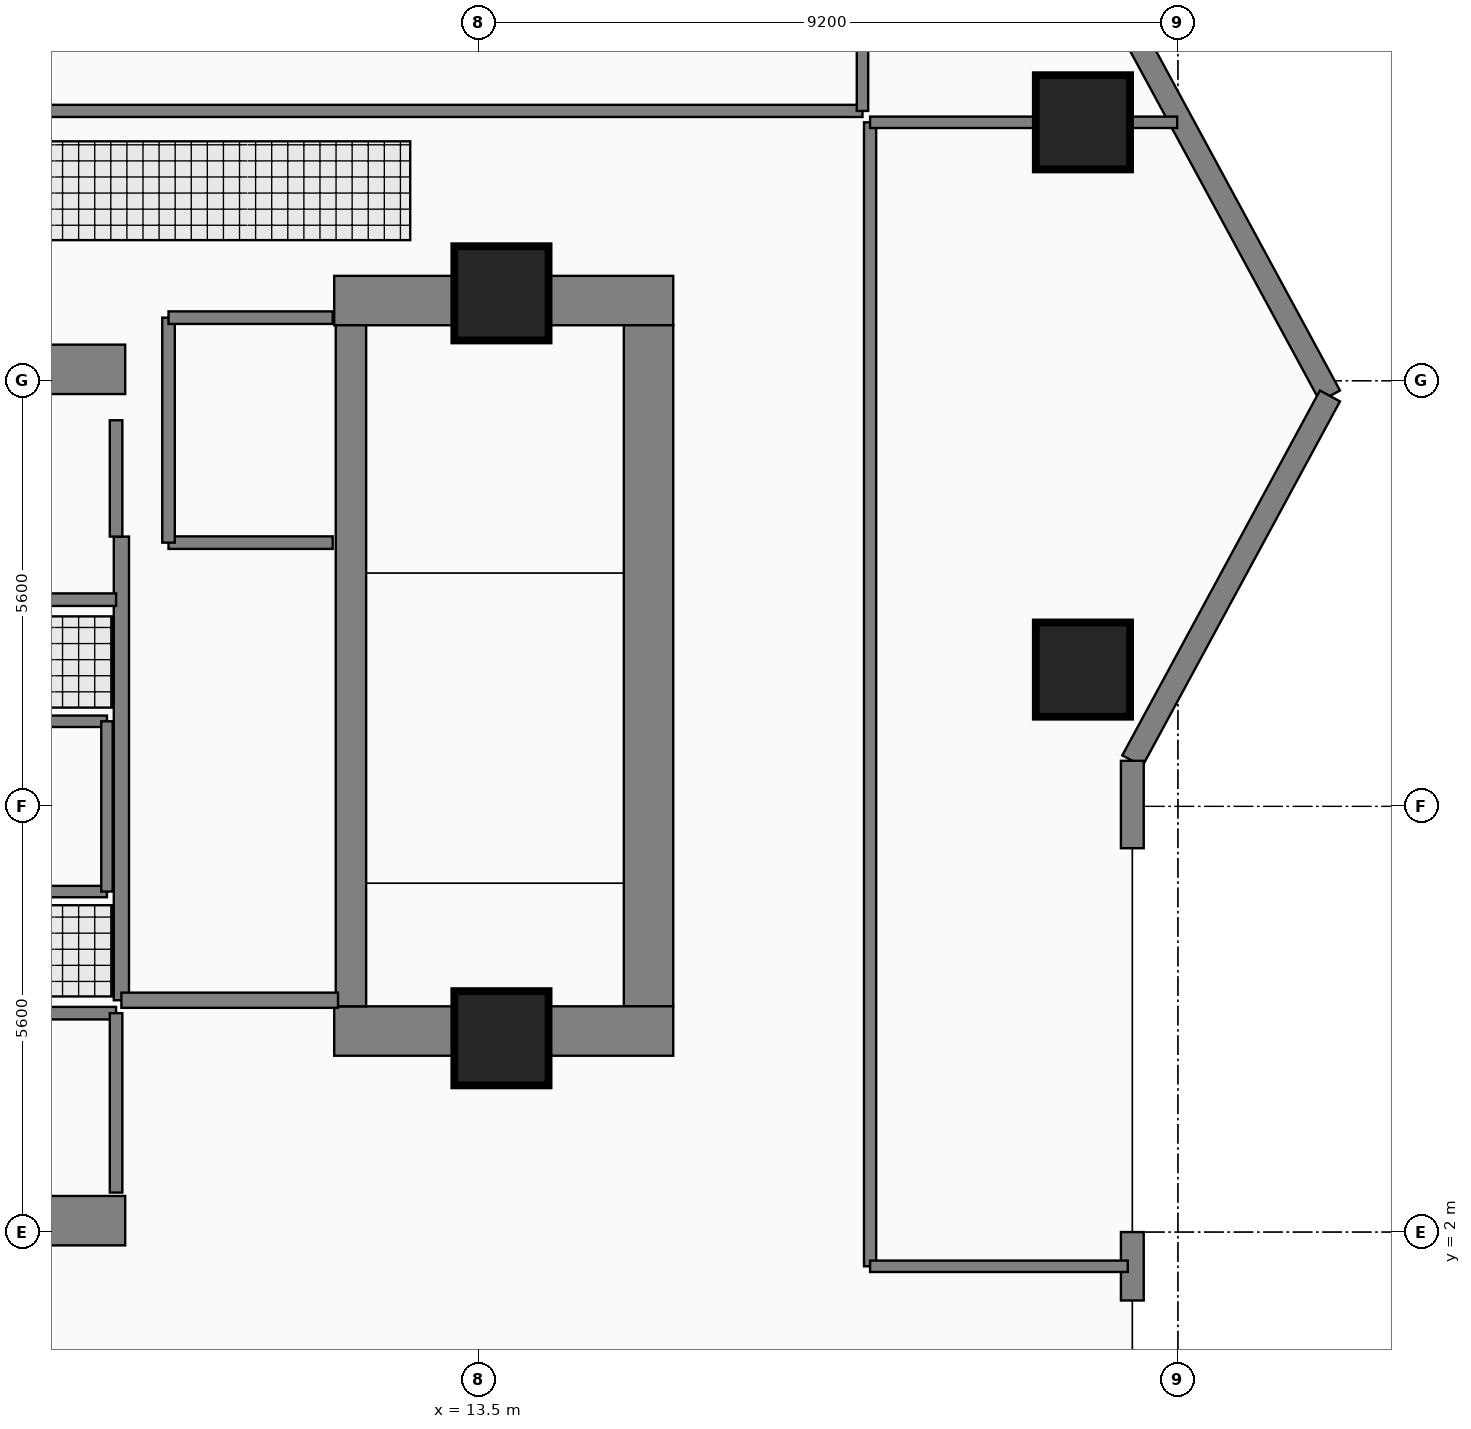
"""IFC4 building model, lengths in metres.
Left out: names, types, materials, properties, quantities, classifications, styles, units other than length and angle.
Written with IfcOpenShell. Run it as: python <this file> out.ifc"""

import sys

from ifc_helpers import new_model, si_unit, direction, frame, frame_2d, origin, origin_2d, place, context, subcontext, project, spatial, rectangle, extrude, element, fill, save


model = new_model("IFC4")
c1 = context("Model", 3, precision=1e-05, world=origin(), true_north=direction((0.0, 1.0)))
c2 = subcontext(c1, "Body", "Model", "MODEL_VIEW")
j1 = project(units=[si_unit("LENGTHUNIT", "METRE"), si_unit("PLANEANGLEUNIT", "RADIAN")], contexts=[c1])
p1 = place(None, origin())
s1 = spatial("IfcSite", under=j1, at=p1, CompositionType="ELEMENT")
p2 = place(p1, origin())
s2 = spatial("IfcBuilding", under=s1, at=p2, CompositionType="ELEMENT")
p3 = place(p2, frame((0.0, 0.0, 168.2)))
s3 = spatial("IfcBuildingStorey", under=s2, at=p3, CompositionType="ELEMENT", Elevation=168.2)
p4 = place(p3, frame((11.6, 14.255, 0.0), z_axis=(0.0, 0.0, 1.0), x_axis=(1.0, 0.0, 0.0)))
e1 = element("IfcWall", 1, at=p4, inside=s3, PredefinedType="SHEAR", context=c2, shape_type="SweptSolid", body=[
    extrude(rectangle(XDim=4.46, YDim=0.65, at=frame_2d((2.23, 0.0))), origin(), (0.0, 0.0, 1.0), 4.41),
])
p5 = place(p3, frame((15.735, 4.97, 0.0), z_axis=(0.0, 0.0, 1.0), x_axis=(0.0, 1.0, 0.0)))
e2 = element("IfcWall", 2, at=p5, inside=s3, PredefinedType="SHEAR", context=c2, shape_type="SweptSolid", body=[
    extrude(rectangle(XDim=8.96, YDim=0.65, at=frame_2d((4.48, 0.0))), origin(), (0.0, 0.0, 1.0), 4.41),
])
p6 = place(p3, frame((11.6, 4.645, 0.0), z_axis=(0.0, 0.0, 1.0), x_axis=(1.0, 0.0, 0.0)))
e3 = element("IfcWall", 3, at=p6, inside=s3, PredefinedType="SHEAR", context=c2, shape_type="SweptSolid", body=[
    extrude(rectangle(XDim=4.46, YDim=0.65, at=frame_2d((2.23, 0.0))), origin(), (0.0, 0.0, 1.0), 4.41),
])
for number, where, z_axis, x_axis in (
    (4, (1.25, 2.15, 0.0), (0.0, 0.0, 1.0), (1.0, 0.0, 0.0)),
    (5, (1.25, 13.35, 0.0), (0.0, 0.0, 1.0), (1.0, 0.0, 0.0)),
):
    element("IfcWall", number, at=place(p3, frame(where, z_axis=z_axis, x_axis=x_axis)), inside=s3, PredefinedType="SHEAR", context=c2, shape_type="SweptSolid", body=[
        extrude(rectangle(XDim=7.6, YDim=0.65, at=frame_2d((3.8, 0.0))), origin(), (0.0, 0.0, 1.0), 4.38),
    ])
p7 = place(p3, frame((11.82, 13.93, 0.0), z_axis=(0.0, 0.0, 1.0), x_axis=(0.0, -1.0, 0.0)))
e6 = element("IfcWall", 6, at=p7, inside=s3, PredefinedType="SHEAR", context=c2, shape_type="SweptSolid", body=[
    extrude(rectangle(XDim=8.96, YDim=0.4, at=frame_2d((4.48, 0.0))), origin(), (0.0, 0.0, 1.0), 4.41),
])
p8 = place(p7, frame((7.53, 0.0, 0.0)))
e7 = element("IfcOpeningElement", 7, at=p8, cuts=e6, PredefinedType="OPENING", context=c2, shape_type="SweptSolid", body=[
    extrude(rectangle(XDim=1.12, YDim=2.22, at=frame_2d((0.56, 1.11))), frame((0.0, 0.21, 0.0), z_axis=(0.0, -1.0, 0.0), x_axis=(1.0, 0.0, 0.0)), (0.0, 0.0, 1.0), 0.42),
])
for number, where, z_axis, x_axis in (
    (8, (13.8, 14.35, 0.0), (0.0, 0.0, 1.0), (1.0, 0.0, 0.0)),
    (9, (13.8, 4.55, 0.0), (0.0, 0.0, 1.0), (1.0, 0.0, 0.0)),
):
    element("IfcColumn", number, at=place(p3, frame(where, z_axis=z_axis, x_axis=x_axis)), inside=s3, PredefinedType="COLUMN", context=c2, shape_type="SweptSolid", body=[
        extrude(rectangle(XDim=1.2, YDim=1.2, at=origin_2d()), origin(), (0.0, 0.0, 1.0), 4.6),
    ])
for number, where, z_axis, x_axis in (
    (10, (21.45, 9.4, 0.43), (0.0, 0.0, 1.0), (1.0, 0.0, 0.0)),
    (11, (21.45, 16.6, 0.43), (0.0, 0.0, 1.0), (1.0, 0.0, 0.0)),
):
    element("IfcColumn", number, at=place(p3, frame(where, z_axis=z_axis, x_axis=x_axis)), inside=s3, PredefinedType="COLUMN", context=c2, shape_type="SweptSolid", body=[
        extrude(rectangle(XDim=1.2, YDim=1.2, at=origin_2d()), origin(), (0.0, 0.0, 1.0), 4.17),
    ])
p9 = place(p3, frame((22.1, 17.8, 0.0), z_axis=(0.0, 0.0, 1.0), x_axis=(0.476258655584, -0.879305233114, 0.0)))
e12 = element("IfcWall", 12, at=p9, inside=s3, PredefinedType="STANDARD", context=c2, shape_type="SweptSolid", body=[
    extrude(rectangle(XDim=5.459, YDim=0.3, at=frame_2d((2.729, 0.0))), origin(), (0.0, 0.0, 1.0), 4.38),
])
p10 = place(p9, frame((2.833, 0.0, 1.25)))
e13 = element("IfcOpeningElement", 13, at=p10, cuts=e12, PredefinedType="OPENING", context=c2, shape_type="SweptSolid", body=[
    extrude(rectangle(XDim=1.15, YDim=1.55, at=frame_2d((0.575, 0.775))), frame((0.0, 0.16, 0.0), z_axis=(0.0, -1.0, 0.0), x_axis=(1.0, 0.0, 0.0)), (0.0, 0.0, 1.0), 0.32),
])
p11 = place(p3, frame((24.7, 13.0, 0.0), z_axis=(0.0, 0.0, 1.0), x_axis=(-0.476258655584, -0.879305233114, 0.0)))
e14 = element("IfcWall", 14, at=p11, inside=s3, PredefinedType="STANDARD", context=c2, shape_type="SweptSolid", body=[
    extrude(rectangle(XDim=5.459, YDim=0.3, at=frame_2d((2.729, 0.0))), origin(), (0.0, 0.0, 1.0), 4.38),
])
p12 = place(p11, frame((2.155, 0.0, 1.25)))
e15 = element("IfcOpeningElement", 15, at=p12, cuts=e14, PredefinedType="OPENING", context=c2, shape_type="SweptSolid", body=[
    extrude(rectangle(XDim=1.15, YDim=1.55, at=frame_2d((0.575, 0.775))), frame((0.0, 0.16, 0.0), z_axis=(0.0, -1.0, 0.0), x_axis=(1.0, 0.0, 0.0)), (0.0, 0.0, 1.0), 0.32),
])
p13 = place(p3, frame((22.1, 8.2, 0.0), z_axis=(0.0, 0.0, 1.0), x_axis=(0.0, -1.0, 0.0)))
e16 = element("IfcWall", 16, at=p13, inside=s3, PredefinedType="STANDARD", context=c2, shape_type="SweptSolid", body=[
    extrude(rectangle(XDim=1.15, YDim=0.3, at=frame_2d((0.575, 0.0))), origin(), (0.0, 0.0, 1.0), 4.38),
])
p14 = place(p3, frame((22.1, 2.0, 0.0), z_axis=(0.0, 0.0, 1.0), x_axis=(0.0, -1.0, 0.0)))
e17 = element("IfcWall", 17, at=p14, inside=s3, PredefinedType="STANDARD", context=c2, shape_type="SweptSolid", body=[
    extrude(rectangle(XDim=0.9, YDim=0.3, at=frame_2d((0.45, 0.0))), origin(), (0.0, 0.0, 1.0), 4.38),
])
p15 = place(p3, frame((8.8, 11.15, 0.0), z_axis=(0.0, 0.0, 1.0), x_axis=(0.0, -1.0, 0.0)))
e18 = element("IfcWall", 18, at=p15, inside=s3, PredefinedType="PARTITIONING", context=c2, shape_type="SweptSolid", body=[
    extrude(rectangle(XDim=6.1, YDim=0.2, at=frame_2d((3.05, 0.0))), origin(), (0.0, 0.0, 1.0), 4.38),
])
p16 = place(p15, frame((1.15, 0.0, 0.0)))
e19 = element("IfcOpeningElement", 19, at=p16, cuts=e18, PredefinedType="OPENING", context=c2, shape_type="SweptSolid", body=[
    extrude(rectangle(XDim=1.1, YDim=2.2, at=frame_2d((0.55, 1.1))), frame((0.0, 0.11, 0.0), z_axis=(0.0, -1.0, 0.0), x_axis=(1.0, 0.0, 0.0)), (0.0, 0.0, 1.0), 0.22),
])
p17 = place(p15, frame((4.75, 0.0, 0.0)))
e20 = element("IfcOpeningElement", 20, at=p17, cuts=e18, PredefinedType="OPENING", context=c2, shape_type="SweptSolid", body=[
    extrude(rectangle(XDim=1.1, YDim=2.2, at=frame_2d((0.55, 1.1))), frame((0.0, 0.11, 0.0), z_axis=(0.0, -1.0, 0.0), x_axis=(1.0, 0.0, 0.0)), (0.0, 0.0, 1.0), 0.22),
])
p18 = place(p3, frame((9.42, 11.07, 0.0), z_axis=(0.0, 0.0, 1.0), x_axis=(1.0, 0.0, 0.0)))
e21 = element("IfcWall", 21, at=p18, inside=s3, PredefinedType="PARTITIONING", context=c2, shape_type="SweptSolid", body=[
    extrude(rectangle(XDim=2.16, YDim=0.165, at=frame_2d((1.08, 0.0))), origin(), (0.0, 0.0, 1.0), 4.38),
])
p19 = place(p18, frame((0.53, 0.0, 0.0)))
e22 = element("IfcOpeningElement", 22, at=p19, cuts=e21, PredefinedType="OPENING", context=c2, shape_type="SweptSolid", body=[
    extrude(rectangle(XDim=1.15, YDim=2.25, at=frame_2d((0.575, 1.125))), frame((0.0, 0.093, 0.0), z_axis=(0.0, -1.0, 0.0), x_axis=(1.0, 0.0, 0.0)), (0.0, 0.0, 1.0), 0.185),
])
p20 = place(p3, frame((6.25, 4.88, 0.0), z_axis=(0.0, 0.0, 1.0), x_axis=(1.0, 0.0, 0.0)))
e23 = element("IfcWall", 23, at=p20, inside=s3, PredefinedType="PARTITIONING", context=c2, shape_type="SweptSolid", body=[
    extrude(rectangle(XDim=2.48, YDim=0.165, at=frame_2d((1.24, 0.0))), origin(), (0.0, 0.0, 1.0), 4.38),
])
p21 = place(p20, frame((0.69, 0.0, 0.0)))
e24 = element("IfcOpeningElement", 24, at=p21, cuts=e23, PredefinedType="OPENING", context=c2, shape_type="SweptSolid", body=[
    extrude(rectangle(XDim=1.1, YDim=2.25, at=frame_2d((0.55, 1.125))), frame((0.0, 0.093, 0.0), z_axis=(0.0, -1.0, 0.0), x_axis=(1.0, 0.0, 0.0)), (0.0, 0.0, 1.0), 0.185),
])
p22 = place(p3, frame((6.25, 10.32, 0.0), z_axis=(0.0, 0.0, 1.0), x_axis=(1.0, 0.0, 0.0)))
e25 = element("IfcWall", 25, at=p22, inside=s3, PredefinedType="PARTITIONING", context=c2, shape_type="SweptSolid", body=[
    extrude(rectangle(XDim=2.48, YDim=0.165, at=frame_2d((1.24, 0.0))), origin(), (0.0, 0.0, 1.0), 4.38),
])
p23 = place(p22, frame((0.69, 0.0, 0.0)))
e26 = element("IfcOpeningElement", 26, at=p23, cuts=e25, PredefinedType="OPENING", context=c2, shape_type="SweptSolid", body=[
    extrude(rectangle(XDim=1.1, YDim=2.25, at=frame_2d((0.55, 1.125))), frame((0.0, 0.093, 0.0), z_axis=(0.0, -1.0, 0.0), x_axis=(1.0, 0.0, 0.0)), (0.0, 0.0, 1.0), 0.185),
])
p24 = place(p3, frame((4.37, 6.48, 0.0), z_axis=(0.0, 0.0, 1.0), x_axis=(1.0, 0.0, 0.0)))
e27 = element("IfcWall", 27, at=p24, inside=s3, PredefinedType="PARTITIONING", context=c2, shape_type="SweptSolid", body=[
    extrude(rectangle(XDim=4.24, YDim=0.15, at=frame_2d((2.12, 0.0))), origin(), (0.0, 0.0, 1.0), 4.38),
])
p25 = place(p24, frame((1.67, 0.0, 0.0)))
e28 = element("IfcOpeningElement", 28, at=p25, cuts=e27, PredefinedType="OPENING", context=c2, shape_type="SweptSolid", body=[
    extrude(rectangle(XDim=0.9, YDim=2.15, at=frame_2d((0.45, 1.075))), frame((0.0, 0.085, 0.0), z_axis=(0.0, -1.0, 0.0), x_axis=(1.0, 0.0, 0.0)), (0.0, 0.0, 1.0), 0.17),
])
p26 = place(p3, frame((0.98, 16.75, 0.0), z_axis=(0.0, 0.0, 1.0), x_axis=(1.0, 0.0, 0.0)))
e29 = element("IfcWall", 29, at=p26, inside=s3, PredefinedType="PARTITIONING", context=c2, shape_type="SweptSolid", body=[
    extrude(rectangle(XDim=17.57, YDim=0.16, at=frame_2d((8.785, 0.0))), origin(), (0.0, 0.0, 1.0), 3.974),
])
p27 = place(p26, frame((10.03, 0.0, 0.0)))
e30 = element("IfcOpeningElement", 30, at=p27, cuts=e29, PredefinedType="OPENING", context=c2, shape_type="SweptSolid", body=[
    extrude(rectangle(XDim=1.08, YDim=2.18, at=frame_2d((0.54, 1.09))), frame((0.0, 0.09, 0.0), z_axis=(0.0, -1.0, 0.0), x_axis=(1.0, 0.0, 0.0)), (0.0, 0.0, 1.0), 0.18),
])
p28 = place(p3, frame((18.65, 1.55, 0.0), z_axis=(0.0, 0.0, 1.0), x_axis=(0.0, 1.0, 0.0)))
e31 = element("IfcWall", 31, at=p28, inside=s3, PredefinedType="PARTITIONING", context=c2, shape_type="SweptSolid", body=[
    extrude(rectangle(XDim=15.05, YDim=0.16, at=frame_2d((7.525, 0.0))), origin(), (0.0, 0.0, 1.0), 4.38),
])
p29 = place(p28, frame((6.985, 0.0, 0.0)))
e32 = element("IfcOpeningElement", 32, at=p29, cuts=e31, PredefinedType="OPENING", context=c2, shape_type="SweptSolid", body=[
    extrude(rectangle(XDim=1.08, YDim=2.18, at=frame_2d((0.54, 1.09))), frame((0.0, 0.09, 0.0), z_axis=(0.0, -1.0, 0.0), x_axis=(1.0, 0.0, 0.0)), (0.0, 0.0, 1.0), 0.18),
])
p30 = place(p3, frame((8.8, 5.05, 0.0), z_axis=(0.0, 0.0, 1.0), x_axis=(1.0, 0.0, 0.0)))
e33 = element("IfcWall", 33, at=p30, inside=s3, PredefinedType="PARTITIONING", context=c2, shape_type="SweptSolid", body=[
    extrude(rectangle(XDim=2.85, YDim=0.2, at=frame_2d((1.425, 0.0))), origin(), (0.0, 0.0, 1.0), 4.38),
])
p31 = place(p3, frame((9.42, 11.07, 0.0), z_axis=(0.0, 0.0, 1.0), x_axis=(0.0, 1.0, 0.0)))
e34 = element("IfcWall", 34, at=p31, inside=s3, PredefinedType="PARTITIONING", context=c2, shape_type="SweptSolid", body=[
    extrude(rectangle(XDim=2.96, YDim=0.165, at=frame_2d((1.48, 0.0))), origin(), (0.0, 0.0, 1.0), 4.38),
])
p32 = place(p3, frame((9.42, 14.03, 0.0), z_axis=(0.0, 0.0, 1.0), x_axis=(1.0, 0.0, 0.0)))
e35 = element("IfcWall", 35, at=p32, inside=s3, PredefinedType="PARTITIONING", context=c2, shape_type="SweptSolid", body=[
    extrude(rectangle(XDim=2.16, YDim=0.165, at=frame_2d((1.08, 0.0))), origin(), (0.0, 0.0, 1.0), 4.38),
])
p33 = place(p3, frame((8.73, 2.52, 0.0), z_axis=(0.0, 0.0, 1.0), x_axis=(0.0, 1.0, 0.0)))
e36 = element("IfcWall", 36, at=p33, inside=s3, PredefinedType="PARTITIONING", context=c2, shape_type="SweptSolid", body=[
    extrude(rectangle(XDim=2.36, YDim=0.165, at=frame_2d((1.18, 0.0))), origin(), (0.0, 0.0, 1.0), 4.38),
])
p34 = place(p3, frame((8.73, 11.15, 0.0), z_axis=(0.0, 0.0, 1.0), x_axis=(0.0, 1.0, 0.0)))
e37 = element("IfcWall", 37, at=p34, inside=s3, PredefinedType="PARTITIONING", context=c2, shape_type="SweptSolid", body=[
    extrude(rectangle(XDim=1.53, YDim=0.165, at=frame_2d((0.765, 0.0))), origin(), (0.0, 0.0, 1.0), 4.38),
])
p35 = place(p3, frame((4.37, 8.72, 0.0), z_axis=(0.0, 0.0, 1.0), x_axis=(1.0, 0.0, 0.0)))
e38 = element("IfcWall", 38, at=p35, inside=s3, PredefinedType="PARTITIONING", context=c2, shape_type="SweptSolid", body=[
    extrude(rectangle(XDim=4.24, YDim=0.15, at=frame_2d((2.12, 0.0))), origin(), (0.0, 0.0, 1.0), 4.38),
])
p36 = place(p3, frame((8.61, 6.48, 0.0), z_axis=(0.0, 0.0, 1.0), x_axis=(0.0, 1.0, 0.0)))
e39 = element("IfcWall", 39, at=p36, inside=s3, PredefinedType="PARTITIONING", context=c2, shape_type="SweptSolid", body=[
    extrude(rectangle(XDim=2.24, YDim=0.15, at=frame_2d((1.12, 0.0))), origin(), (0.0, 0.0, 1.0), 4.38),
])
p37 = place(p3, frame((18.55, 16.75, 0.0), z_axis=(0.0, 0.0, 1.0), x_axis=(0.0, 1.0, 0.0)))
e40 = element("IfcWall", 40, at=p37, inside=s3, PredefinedType="PARTITIONING", context=c2, shape_type="SweptSolid", body=[
    extrude(rectangle(XDim=8.2, YDim=0.15, at=frame_2d((4.1, 0.0))), origin(), (0.0, 0.0, 1.0), 4.38),
])
p38 = place(p3, frame((18.65, 1.55, 0.0), z_axis=(0.0, 0.0, 1.0), x_axis=(1.0, 0.0, 0.0)))
e41 = element("IfcWall", 41, at=p38, inside=s3, PredefinedType="PARTITIONING", context=c2, shape_type="SweptSolid", body=[
    extrude(rectangle(XDim=3.39, YDim=0.15, at=frame_2d((1.695, 0.0))), origin(), (0.0, 0.0, 1.0), 4.38),
])
p39 = place(p3, frame((18.65, 16.6, 0.0), z_axis=(0.0, 0.0, 1.0), x_axis=(1.0, 0.0, 0.0)))
e42 = element("IfcWall", 42, at=p39, inside=s3, PredefinedType="PARTITIONING", context=c2, shape_type="SweptSolid", body=[
    extrude(rectangle(XDim=4.04, YDim=0.15, at=frame_2d((2.02, 0.0))), origin(), (0.0, 0.0, 1.0), 4.38),
])
p40 = place(p10, origin())
e43 = element("IfcWindow", 43, at=p40, inside=s3, PartitioningType="SINGLE_PANEL", PredefinedType="WINDOW", context=c2, shape_type="SweptSolid", body=[
    extrude(rectangle(XDim=1.15, YDim=1.55, at=frame_2d((0.575, 0.775))), frame((0.0, 0.03, 0.0), z_axis=(0.0, -1.0, 0.0), x_axis=(1.0, 0.0, 0.0)), (0.0, 0.0, 1.0), 0.06),
])
fill(e13, e43)
p41 = place(p12, origin())
e44 = element("IfcWindow", 44, at=p41, inside=s3, PartitioningType="SINGLE_PANEL", PredefinedType="WINDOW", context=c2, shape_type="SweptSolid", body=[
    extrude(rectangle(XDim=1.15, YDim=1.55, at=frame_2d((0.575, 0.775))), frame((0.0, 0.03, 0.0), z_axis=(0.0, -1.0, 0.0), x_axis=(1.0, 0.0, 0.0)), (0.0, 0.0, 1.0), 0.06),
])
fill(e15, e44)
p42 = place(p8, origin())
e45 = element("IfcDoor", 45, at=p42, inside=s3, OperationType="SINGLE_SWING_RIGHT", PredefinedType="DOOR", context=c2, shape_type="SweptSolid", body=[
    extrude(rectangle(XDim=1.12, YDim=2.22, at=frame_2d((0.56, 1.11))), frame((0.0, 0.025, 0.0), z_axis=(0.0, -1.0, 0.0), x_axis=(1.0, 0.0, 0.0)), (0.0, 0.0, 1.0), 0.05),
])
fill(e7, e45)
p43 = place(p16, origin())
e46 = element("IfcDoor", 46, at=p43, inside=s3, OperationType="SINGLE_SWING_LEFT", PredefinedType="DOOR", context=c2, shape_type="SweptSolid", body=[
    extrude(rectangle(XDim=1.1, YDim=2.2, at=frame_2d((0.55, 1.1))), frame((0.0, 0.025, 0.0), z_axis=(0.0, -1.0, 0.0), x_axis=(1.0, 0.0, 0.0)), (0.0, 0.0, 1.0), 0.05),
])
fill(e19, e46)
p44 = place(p17, origin())
e47 = element("IfcDoor", 47, at=p44, inside=s3, OperationType="SINGLE_SWING_RIGHT", PredefinedType="DOOR", context=c2, shape_type="SweptSolid", body=[
    extrude(rectangle(XDim=1.1, YDim=2.2, at=frame_2d((0.55, 1.1))), frame((0.0, 0.025, 0.0), z_axis=(0.0, -1.0, 0.0), x_axis=(1.0, 0.0, 0.0)), (0.0, 0.0, 1.0), 0.05),
])
fill(e20, e47)
p45 = place(p19, origin())
e48 = element("IfcDoor", 48, at=p45, inside=s3, OperationType="SLIDING_TO_LEFT", PredefinedType="DOOR", context=c2, shape_type="SweptSolid", body=[
    extrude(rectangle(XDim=1.15, YDim=2.25, at=frame_2d((0.575, 1.125))), frame((0.0, 0.025, 0.0), z_axis=(0.0, -1.0, 0.0), x_axis=(1.0, 0.0, 0.0)), (0.0, 0.0, 1.0), 0.05),
])
fill(e22, e48)
p46 = place(p21, origin())
e49 = element("IfcDoor", 49, at=p46, inside=s3, OperationType="SLIDING_TO_LEFT", PredefinedType="DOOR", context=c2, shape_type="SweptSolid", body=[
    extrude(rectangle(XDim=1.1, YDim=2.25, at=frame_2d((0.55, 1.125))), frame((0.0, 0.025, 0.0), z_axis=(0.0, -1.0, 0.0), x_axis=(1.0, 0.0, 0.0)), (0.0, 0.0, 1.0), 0.05),
])
fill(e24, e49)
p47 = place(p23, origin())
e50 = element("IfcDoor", 50, at=p47, inside=s3, OperationType="SLIDING_TO_LEFT", PredefinedType="DOOR", context=c2, shape_type="SweptSolid", body=[
    extrude(rectangle(XDim=1.1, YDim=2.25, at=frame_2d((0.55, 1.125))), frame((0.0, 0.025, 0.0), z_axis=(0.0, -1.0, 0.0), x_axis=(1.0, 0.0, 0.0)), (0.0, 0.0, 1.0), 0.05),
])
fill(e26, e50)
p48 = place(p27, origin())
e51 = element("IfcDoor", 51, at=p48, inside=s3, OperationType="SINGLE_SWING_RIGHT", PredefinedType="DOOR", context=c2, shape_type="SweptSolid", body=[
    extrude(rectangle(XDim=1.08, YDim=2.18, at=frame_2d((0.54, 1.09))), frame((0.0, 0.025, 0.0), z_axis=(0.0, -1.0, 0.0), x_axis=(1.0, 0.0, 0.0)), (0.0, 0.0, 1.0), 0.05),
])
fill(e30, e51)
p49 = place(p29, origin())
e52 = element("IfcDoor", 52, at=p49, inside=s3, OperationType="SINGLE_SWING_RIGHT", PredefinedType="DOOR", context=c2, shape_type="SweptSolid", body=[
    extrude(rectangle(XDim=1.08, YDim=2.18, at=frame_2d((0.54, 1.09))), frame((0.0, 0.025, 0.0), z_axis=(0.0, -1.0, 0.0), x_axis=(1.0, 0.0, 0.0)), (0.0, 0.0, 1.0), 0.05),
])
fill(e32, e52)
save(model, sys.argv[1])
